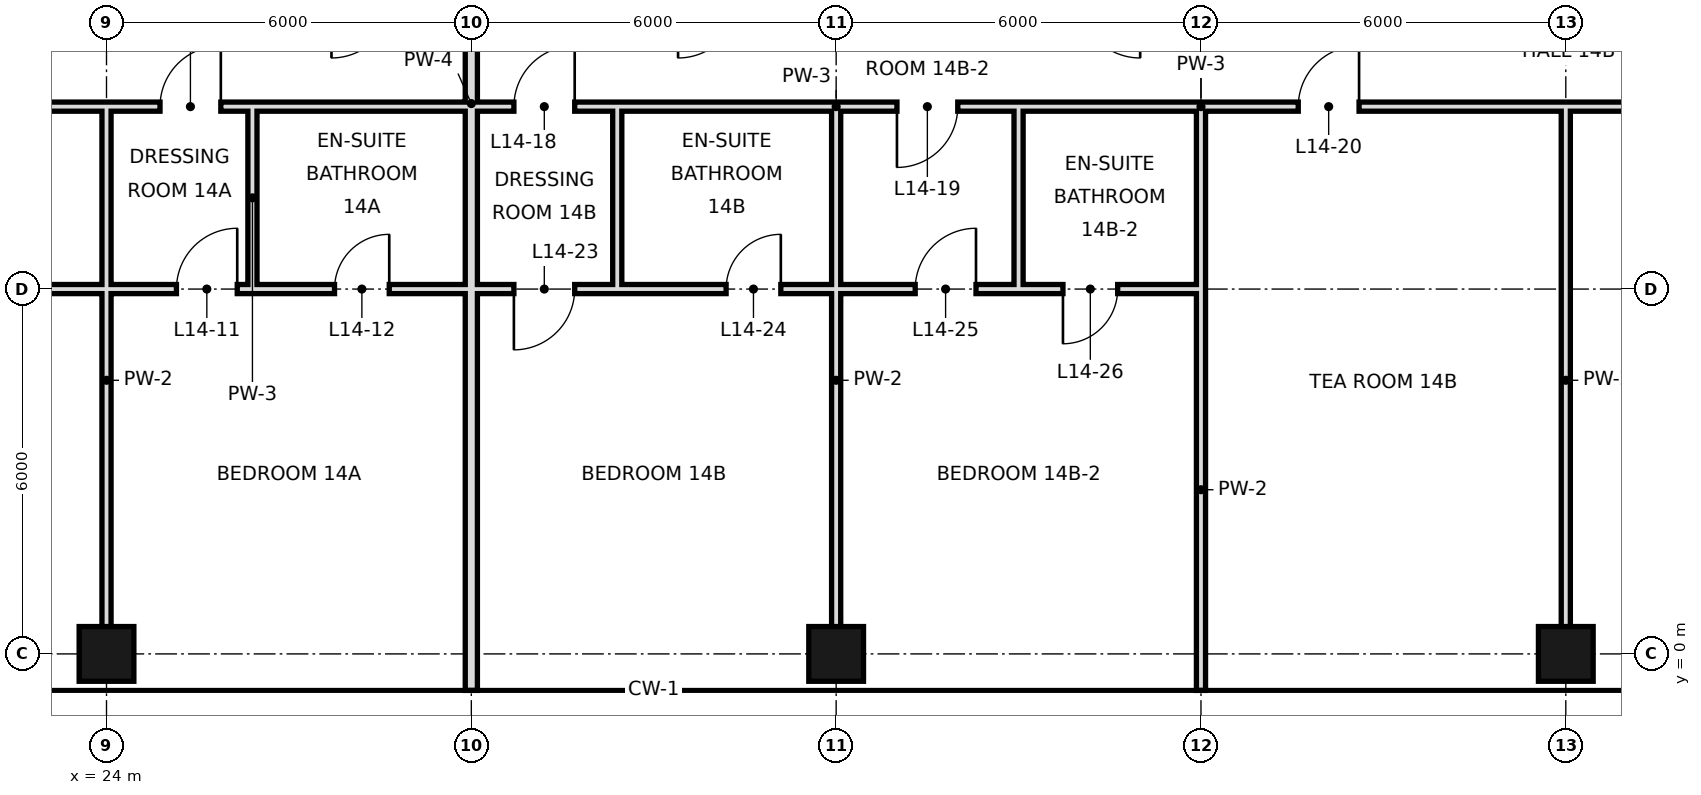
"""IFC4 building model, lengths in metres.
Left out: names, types, materials, properties, quantities, classifications, styles, units other than length and angle.
Written with IfcOpenShell. Run it as: python <this file> out.ifc"""

import sys

from ifc_helpers import new_model, si_unit, direction, frame, frame_2d, origin, origin_2d, place, context, subcontext, project, spatial, rectangle, hollow_rectangle, extrude, element, fill, save


model = new_model("IFC4")
c1 = context("Model", 3, precision=1e-05, world=origin(), true_north=direction((0.0, 1.0)))
c2 = subcontext(c1, "Body", "Model", "MODEL_VIEW")
j1 = project(units=[si_unit("LENGTHUNIT", "METRE"), si_unit("PLANEANGLEUNIT", "RADIAN")], contexts=[c1])
p1 = place(None, origin())
s1 = spatial("IfcSite", under=j1, at=p1, CompositionType="ELEMENT")
p2 = place(p1, origin())
s2 = spatial("IfcBuilding", under=s1, at=p2, CompositionType="ELEMENT")
p3 = place(p2, frame((0.0, 0.0, 71.4)))
s3 = spatial("IfcBuildingStorey", under=s2, at=p3, CompositionType="ELEMENT", Elevation=71.4)
for number, where, z_axis, x_axis in (
    (1, (24.0, 0.0, 0.0), (0.0, 0.0, 1.0), (1.0, 0.0, 0.0)),
    (2, (36.0, 0.0, 0.0), (0.0, 0.0, 1.0), (1.0, 0.0, 0.0)),
    (3, (48.0, 0.0, 0.0), (0.0, 0.0, 1.0), (1.0, 0.0, 0.0)),
):
    element("IfcColumn", number, at=place(p3, frame(where, z_axis=z_axis, x_axis=x_axis)), inside=s3, PredefinedType="COLUMN", context=c2, shape_type="SweptSolid", body=[
        extrude(hollow_rectangle(XDim=0.9, YDim=0.9, WallThickness=0.045, at=origin_2d()), origin(), (0.0, 0.0, 1.0), 3.6),
    ])
p4 = place(p3, frame((24.0, 0.0, 0.0), z_axis=(0.0, 0.0, 1.0), x_axis=(0.0, 1.0, 0.0)))
e4 = element("IfcWall", 4, at=p4, inside=s3, PredefinedType="PARTITIONING", context=c2, shape_type="SweptSolid", body=[
    extrude(rectangle(XDim=9.0, YDim=0.15, at=frame_2d((4.5, 0.0))), origin(), (0.0, 0.0, 1.0), 2.72),
])
p5 = place(p3, frame((26.4, 6.0, 0.0), z_axis=(0.0, 0.0, 1.0), x_axis=(0.0, 1.0, 0.0)))
e5 = element("IfcWall", 5, at=p5, inside=s3, PredefinedType="PARTITIONING", context=c2, shape_type="SweptSolid", body=[
    extrude(rectangle(XDim=3.0, YDim=0.15, at=frame_2d((1.5, 0.0))), origin(), (0.0, 0.0, 1.0), 3.42),
])
p6 = place(p3, frame((30.0, -0.6, 0.0), z_axis=(0.0, 0.0, 1.0), x_axis=(0.0, 1.0, 0.0)))
e6 = element("IfcWall", 6, at=p6, inside=s3, PredefinedType="SOLIDWALL", context=c2, shape_type="SweptSolid", body=[
    extrude(rectangle(XDim=19.3, YDim=0.2, at=frame_2d((9.65, 0.0))), origin(), (0.0, 0.0, 1.0), 2.72),
])
p7 = place(p3, frame((32.4, 6.0, 0.0), z_axis=(0.0, 0.0, 1.0), x_axis=(0.0, 1.0, 0.0)))
e7 = element("IfcWall", 7, at=p7, inside=s3, PredefinedType="PARTITIONING", context=c2, shape_type="SweptSolid", body=[
    extrude(rectangle(XDim=3.0, YDim=0.15, at=frame_2d((1.5, 0.0))), origin(), (0.0, 0.0, 1.0), 3.42),
])
p8 = place(p3, frame((36.0, 0.0, 0.0), z_axis=(0.0, 0.0, 1.0), x_axis=(0.0, 1.0, 0.0)))
e8 = element("IfcWall", 8, at=p8, inside=s3, PredefinedType="PARTITIONING", context=c2, shape_type="SweptSolid", body=[
    extrude(rectangle(XDim=6.0, YDim=0.15, at=frame_2d((3.0, 0.0))), origin(), (0.0, 0.0, 1.0), 2.72),
])
p9 = place(p3, frame((36.0, 6.0, 0.0), z_axis=(0.0, 0.0, 1.0), x_axis=(0.0, 1.0, 0.0)))
e9 = element("IfcWall", 9, at=p9, inside=s3, PredefinedType="PARTITIONING", context=c2, shape_type="SweptSolid", body=[
    extrude(rectangle(XDim=3.0, YDim=0.15, at=frame_2d((1.5, 0.0))), origin(), (0.0, 0.0, 1.0), 2.72),
])
p10 = place(p3, frame((39.0, 6.0, 0.0), z_axis=(0.0, 0.0, 1.0), x_axis=(0.0, 1.0, 0.0)))
e10 = element("IfcWall", 10, at=p10, inside=s3, PredefinedType="PARTITIONING", context=c2, shape_type="SweptSolid", body=[
    extrude(rectangle(XDim=3.0, YDim=0.15, at=frame_2d((1.5, 0.0))), origin(), (0.0, 0.0, 1.0), 3.42),
])
p11 = place(p3, frame((42.0, -0.6, 0.0), z_axis=(0.0, 0.0, 1.0), x_axis=(0.0, 1.0, 0.0)))
e11 = element("IfcWall", 11, at=p11, inside=s3, PredefinedType="PARTITIONING", context=c2, shape_type="SweptSolid", body=[
    extrude(rectangle(XDim=6.6, YDim=0.15, at=frame_2d((3.3, 0.0))), origin(), (0.0, 0.0, 1.0), 2.72),
])
p12 = place(p3, frame((42.0, 6.0, 0.0), z_axis=(0.0, 0.0, 1.0), x_axis=(0.0, 1.0, 0.0)))
e12 = element("IfcWall", 12, at=p12, inside=s3, PredefinedType="PARTITIONING", context=c2, shape_type="SweptSolid", body=[
    extrude(rectangle(XDim=3.0, YDim=0.15, at=frame_2d((1.5, 0.0))), origin(), (0.0, 0.0, 1.0), 2.72),
])
p13 = place(p3, frame((48.0, 0.0, 0.0), z_axis=(0.0, 0.0, 1.0), x_axis=(0.0, 1.0, 0.0)))
e13 = element("IfcWall", 13, at=p13, inside=s3, PredefinedType="PARTITIONING", context=c2, shape_type="SweptSolid", body=[
    extrude(rectangle(XDim=9.0, YDim=0.15, at=frame_2d((4.5, 0.0))), origin(), (0.0, 0.0, 1.0), 2.72),
])
p14 = place(p3, frame((0.0, 6.0, 0.0), z_axis=(0.0, 0.0, 1.0), x_axis=(1.0, 0.0, 0.0)))
e14 = element("IfcWall", 14, at=p14, inside=s3, PredefinedType="PARTITIONING", context=c2, shape_type="SweptSolid", body=[
    extrude(rectangle(XDim=26.4, YDim=0.15, at=frame_2d((13.2, 0.0))), origin(), (0.0, 0.0, 1.0), 2.97),
])
p15 = place(p14, frame((5.1, 0.0, 0.0)))
e15 = element("IfcOpeningElement", 15, at=p15, cuts=e14, PredefinedType="OPENING", context=c2, shape_type="SweptSolid", body=[
    extrude(rectangle(XDim=1.8, YDim=2.4, at=frame_2d((0.9, 1.2))), frame((0.0, 0.085, 0.0), z_axis=(0.0, -1.0, 0.0), x_axis=(1.0, 0.0, 0.0)), (0.0, 0.0, 1.0), 0.17),
])
p16 = place(p14, frame((12.25, 0.0, 0.0)))
e16 = element("IfcOpeningElement", 16, at=p16, cuts=e14, PredefinedType="OPENING", context=c2, shape_type="SweptSolid", body=[
    extrude(rectangle(XDim=1.8, YDim=2.4, at=frame_2d((0.9, 1.2))), frame((0.0, 0.085, 0.0), z_axis=(0.0, -1.0, 0.0), x_axis=(1.0, 0.0, 0.0)), (0.0, 0.0, 1.0), 0.17),
])
p17 = place(p14, frame((25.15, 0.0, 0.0)))
e17 = element("IfcOpeningElement", 17, at=p17, cuts=e14, PredefinedType="OPENING", context=c2, shape_type="SweptSolid", body=[
    extrude(rectangle(XDim=1.0, YDim=2.4, at=frame_2d((0.5, 1.2))), frame((0.0, 0.085, 0.0), z_axis=(0.0, -1.0, 0.0), x_axis=(1.0, 0.0, 0.0)), (0.0, 0.0, 1.0), 0.17),
])
p18 = place(p3, frame((30.0, 6.0, 0.0), z_axis=(0.0, 0.0, 1.0), x_axis=(1.0, 0.0, 0.0)))
e18 = element("IfcWall", 18, at=p18, inside=s3, PredefinedType="PARTITIONING", context=c2, shape_type="SweptSolid", body=[
    extrude(rectangle(XDim=2.4, YDim=0.15, at=frame_2d((1.2, 0.0))), origin(), (0.0, 0.0, 1.0), 2.97),
])
p19 = place(p18, frame((0.7, 0.0, 0.0)))
e19 = element("IfcOpeningElement", 19, at=p19, cuts=e18, PredefinedType="OPENING", context=c2, shape_type="SweptSolid", body=[
    extrude(rectangle(XDim=1.0, YDim=2.4, at=frame_2d((0.5, 1.2))), frame((0.0, 0.085, 0.0), z_axis=(0.0, -1.0, 0.0), x_axis=(1.0, 0.0, 0.0)), (0.0, 0.0, 1.0), 0.17),
])
p20 = place(p3, frame((36.0, 6.0, 0.0), z_axis=(0.0, 0.0, 1.0), x_axis=(1.0, 0.0, 0.0)))
e20 = element("IfcWall", 20, at=p20, inside=s3, PredefinedType="PARTITIONING", context=c2, shape_type="SweptSolid", body=[
    extrude(rectangle(XDim=3.0, YDim=0.15, at=frame_2d((1.5, 0.0))), origin(), (0.0, 0.0, 1.0), 2.97),
])
p21 = place(p20, frame((1.3, 0.0, 0.0)))
e21 = element("IfcOpeningElement", 21, at=p21, cuts=e20, PredefinedType="OPENING", context=c2, shape_type="SweptSolid", body=[
    extrude(rectangle(XDim=1.0, YDim=2.4, at=frame_2d((0.5, 1.2))), frame((0.0, 0.085, 0.0), z_axis=(0.0, -1.0, 0.0), x_axis=(1.0, 0.0, 0.0)), (0.0, 0.0, 1.0), 0.17),
])
p22 = place(p3, frame((26.4, 6.0, 0.0), z_axis=(0.0, 0.0, 1.0), x_axis=(1.0, 0.0, 0.0)))
e22 = element("IfcWall", 22, at=p22, inside=s3, PredefinedType="PARTITIONING", context=c2, shape_type="SweptSolid", body=[
    extrude(rectangle(XDim=3.6, YDim=0.15, at=frame_2d((1.8, 0.0))), origin(), (0.0, 0.0, 1.0), 2.97),
])
p23 = place(p22, frame((1.35, 0.0, 0.0)))
e23 = element("IfcOpeningElement", 23, at=p23, cuts=e22, PredefinedType="OPENING", context=c2, shape_type="SweptSolid", body=[
    extrude(rectangle(XDim=0.9, YDim=2.4, at=frame_2d((0.45, 1.2))), frame((0.0, 0.085, 0.0), z_axis=(0.0, -1.0, 0.0), x_axis=(1.0, 0.0, 0.0)), (0.0, 0.0, 1.0), 0.17),
])
p24 = place(p3, frame((32.4, 6.0, 0.0), z_axis=(0.0, 0.0, 1.0), x_axis=(1.0, 0.0, 0.0)))
e24 = element("IfcWall", 24, at=p24, inside=s3, PredefinedType="PARTITIONING", context=c2, shape_type="SweptSolid", body=[
    extrude(rectangle(XDim=3.6, YDim=0.15, at=frame_2d((1.8, 0.0))), origin(), (0.0, 0.0, 1.0), 2.97),
])
p25 = place(p24, frame((1.79, 0.0, 0.0)))
e25 = element("IfcOpeningElement", 25, at=p25, cuts=e24, PredefinedType="OPENING", context=c2, shape_type="SweptSolid", body=[
    extrude(rectangle(XDim=0.9, YDim=2.4, at=frame_2d((0.45, 1.2))), frame((0.0, 0.085, 0.0), z_axis=(0.0, -1.0, 0.0), x_axis=(1.0, 0.0, 0.0)), (0.0, 0.0, 1.0), 0.17),
])
p26 = place(p3, frame((39.0, 6.0, 0.0), z_axis=(0.0, 0.0, 1.0), x_axis=(1.0, 0.0, 0.0)))
e26 = element("IfcWall", 26, at=p26, inside=s3, PredefinedType="PARTITIONING", context=c2, shape_type="SweptSolid", body=[
    extrude(rectangle(XDim=3.0, YDim=0.15, at=frame_2d((1.5, 0.0))), origin(), (0.0, 0.0, 1.0), 2.97),
])
p27 = place(p26, frame((0.73, 0.0, 0.0)))
e27 = element("IfcOpeningElement", 27, at=p27, cuts=e26, PredefinedType="OPENING", context=c2, shape_type="SweptSolid", body=[
    extrude(rectangle(XDim=0.9, YDim=2.4, at=frame_2d((0.45, 1.2))), frame((0.0, 0.085, 0.0), z_axis=(0.0, -1.0, 0.0), x_axis=(1.0, 0.0, 0.0)), (0.0, 0.0, 1.0), 0.17),
])
p28 = place(p3, frame((-0.6, 9.0, 0.0), z_axis=(0.0, 0.0, 1.0), x_axis=(1.0, 0.0, 0.0)))
e28 = element("IfcWall", 28, at=p28, inside=s3, PredefinedType="PARTITIONING", context=c2, shape_type="SweptSolid", body=[
    extrude(rectangle(XDim=27.0, YDim=0.15, at=frame_2d((13.5, 0.0))), origin(), (0.0, 0.0, 1.0), 3.42),
])
p29 = place(p28, frame((5.7, 0.0, 0.0)))
e29 = element("IfcOpeningElement", 29, at=p29, cuts=e28, PredefinedType="OPENING", context=c2, shape_type="SweptSolid", body=[
    extrude(rectangle(XDim=1.8, YDim=2.4, at=frame_2d((0.9, 1.2))), frame((0.0, 0.085, 0.0), z_axis=(0.0, -1.0, 0.0), x_axis=(1.0, 0.0, 0.0)), (0.0, 0.0, 1.0), 0.17),
])
p30 = place(p28, frame((17.7, 0.0, 0.0)))
e30 = element("IfcOpeningElement", 30, at=p30, cuts=e28, PredefinedType="OPENING", context=c2, shape_type="SweptSolid", body=[
    extrude(rectangle(XDim=1.8, YDim=2.4, at=frame_2d((0.9, 1.2))), frame((0.0, 0.085, 0.0), z_axis=(0.0, -1.0, 0.0), x_axis=(1.0, 0.0, 0.0)), (0.0, 0.0, 1.0), 0.17),
])
p31 = place(p28, frame((25.48, 0.0, 0.0)))
e31 = element("IfcOpeningElement", 31, at=p31, cuts=e28, PredefinedType="OPENING", context=c2, shape_type="SweptSolid", body=[
    extrude(rectangle(XDim=1.0, YDim=2.4, at=frame_2d((0.5, 1.2))), frame((0.0, 0.085, 0.0), z_axis=(0.0, -1.0, 0.0), x_axis=(1.0, 0.0, 0.0)), (0.0, 0.0, 1.0), 0.17),
])
p32 = place(p3, frame((30.0, 9.0, 0.0), z_axis=(0.0, 0.0, 1.0), x_axis=(1.0, 0.0, 0.0)))
e32 = element("IfcWall", 32, at=p32, inside=s3, PredefinedType="PARTITIONING", context=c2, shape_type="SweptSolid", body=[
    extrude(rectangle(XDim=2.4, YDim=0.15, at=frame_2d((1.2, 0.0))), origin(), (0.0, 0.0, 1.0), 3.42),
])
p33 = place(p32, frame((0.7, 0.0, 0.0)))
e33 = element("IfcOpeningElement", 33, at=p33, cuts=e32, PredefinedType="OPENING", context=c2, shape_type="SweptSolid", body=[
    extrude(rectangle(XDim=1.0, YDim=2.4, at=frame_2d((0.5, 1.2))), frame((0.0, 0.085, 0.0), z_axis=(0.0, -1.0, 0.0), x_axis=(1.0, 0.0, 0.0)), (0.0, 0.0, 1.0), 0.17),
])
p34 = place(p3, frame((36.0, 9.0, 0.0), z_axis=(0.0, 0.0, 1.0), x_axis=(1.0, 0.0, 0.0)))
e34 = element("IfcWall", 34, at=p34, inside=s3, PredefinedType="PARTITIONING", context=c2, shape_type="SweptSolid", body=[
    extrude(rectangle(XDim=3.0, YDim=0.15, at=frame_2d((1.5, 0.0))), origin(), (0.0, 0.0, 1.0), 3.42),
])
p35 = place(p34, frame((1.0, 0.0, 0.0)))
e35 = element("IfcOpeningElement", 35, at=p35, cuts=e34, PredefinedType="OPENING", context=c2, shape_type="SweptSolid", body=[
    extrude(rectangle(XDim=1.0, YDim=2.4, at=frame_2d((0.5, 1.2))), frame((0.0, 0.085, 0.0), z_axis=(0.0, -1.0, 0.0), x_axis=(1.0, 0.0, 0.0)), (0.0, 0.0, 1.0), 0.17),
])
p36 = place(p3, frame((42.0, 9.0, 0.0), z_axis=(0.0, 0.0, 1.0), x_axis=(1.0, 0.0, 0.0)))
e36 = element("IfcWall", 36, at=p36, inside=s3, PredefinedType="PARTITIONING", context=c2, shape_type="SweptSolid", body=[
    extrude(rectangle(XDim=24.6, YDim=0.15, at=frame_2d((12.3, 0.0))), origin(), (0.0, 0.0, 1.0), 3.42),
])
p37 = place(p36, frame((1.6, 0.0, 0.0)))
e37 = element("IfcOpeningElement", 37, at=p37, cuts=e36, PredefinedType="OPENING", context=c2, shape_type="SweptSolid", body=[
    extrude(rectangle(XDim=1.0, YDim=2.4, at=frame_2d((0.5, 1.2))), frame((0.0, 0.085, 0.0), z_axis=(0.0, -1.0, 0.0), x_axis=(1.0, 0.0, 0.0)), (0.0, 0.0, 1.0), 0.17),
])
p38 = place(p36, frame((8.5, 0.0, 0.0)))
e38 = element("IfcOpeningElement", 38, at=p38, cuts=e36, PredefinedType="OPENING", context=c2, shape_type="SweptSolid", body=[
    extrude(rectangle(XDim=1.0, YDim=2.4, at=frame_2d((0.5, 1.2))), frame((0.0, 0.085, 0.0), z_axis=(0.0, -1.0, 0.0), x_axis=(1.0, 0.0, 0.0)), (0.0, 0.0, 1.0), 0.17),
])
p39 = place(p36, frame((12.25, 0.0, 0.0)))
e39 = element("IfcOpeningElement", 39, at=p39, cuts=e36, PredefinedType="OPENING", context=c2, shape_type="SweptSolid", body=[
    extrude(rectangle(XDim=1.8, YDim=2.4, at=frame_2d((0.9, 1.2))), frame((0.0, 0.085, 0.0), z_axis=(0.0, -1.0, 0.0), x_axis=(1.0, 0.0, 0.0)), (0.0, 0.0, 1.0), 0.17),
])
for number, where, z_axis, x_axis in (
    (40, (26.4, 9.0, 0.0), (0.0, 0.0, 1.0), (1.0, 0.0, 0.0)),
    (41, (32.4, 9.0, 0.0), (0.0, 0.0, 1.0), (1.0, 0.0, 0.0)),
):
    element("IfcWall", number, at=place(p3, frame(where, z_axis=z_axis, x_axis=x_axis)), inside=s3, PredefinedType="PARTITIONING", context=c2, shape_type="SweptSolid", body=[
        extrude(rectangle(XDim=3.6, YDim=0.15, at=frame_2d((1.8, 0.0))), origin(), (0.0, 0.0, 1.0), 3.42),
    ])
p40 = place(p3, frame((39.0, 9.0, 0.0), z_axis=(0.0, 0.0, 1.0), x_axis=(1.0, 0.0, 0.0)))
e42 = element("IfcWall", 42, at=p40, inside=s3, PredefinedType="PARTITIONING", context=c2, shape_type="SweptSolid", body=[
    extrude(rectangle(XDim=3.0, YDim=0.15, at=frame_2d((1.5, 0.0))), origin(), (0.0, 0.0, 1.0), 3.42),
])
p41 = place(p31, frame((1.0, 0.0, 0.0), z_axis=(0.0, 0.0, 1.0), x_axis=(-1.0, 0.0, 0.0)))
e43 = element("IfcDoor", 43, at=p41, inside=s3, OperationType="SINGLE_SWING_LEFT", PredefinedType="DOOR", context=c2, shape_type="SweptSolid", body=[
    extrude(rectangle(XDim=1.0, YDim=2.4, at=frame_2d((0.5, 1.2))), frame((0.0, 0.025, 0.0), z_axis=(0.0, -1.0, 0.0), x_axis=(1.0, 0.0, 0.0)), (0.0, 0.0, 1.0), 0.05),
])
fill(e31, e43)
p42 = place(p17, frame((1.0, 0.0, 0.0), z_axis=(0.0, 0.0, 1.0), x_axis=(-1.0, 0.0, 0.0)))
e44 = element("IfcDoor", 44, at=p42, inside=s3, OperationType="SINGLE_SWING_LEFT", PredefinedType="DOOR", context=c2, shape_type="SweptSolid", body=[
    extrude(rectangle(XDim=1.0, YDim=2.4, at=frame_2d((0.5, 1.2))), frame((0.0, 0.025, 0.0), z_axis=(0.0, -1.0, 0.0), x_axis=(1.0, 0.0, 0.0)), (0.0, 0.0, 1.0), 0.05),
])
fill(e17, e44)
p43 = place(p23, frame((0.9, 0.0, 0.0), z_axis=(0.0, 0.0, 1.0), x_axis=(-1.0, 0.0, 0.0)))
e45 = element("IfcDoor", 45, at=p43, inside=s3, OperationType="SINGLE_SWING_LEFT", PredefinedType="DOOR", context=c2, shape_type="SweptSolid", body=[
    extrude(rectangle(XDim=0.9, YDim=2.4, at=frame_2d((0.45, 1.2))), frame((0.0, 0.025, 0.0), z_axis=(0.0, -1.0, 0.0), x_axis=(1.0, 0.0, 0.0)), (0.0, 0.0, 1.0), 0.05),
])
fill(e23, e45)
p44 = place(p33, frame((1.0, 0.0, 0.0), z_axis=(0.0, 0.0, 1.0), x_axis=(-1.0, 0.0, 0.0)))
e46 = element("IfcDoor", 46, at=p44, inside=s3, OperationType="SINGLE_SWING_LEFT", PredefinedType="DOOR", context=c2, shape_type="SweptSolid", body=[
    extrude(rectangle(XDim=1.0, YDim=2.4, at=frame_2d((0.5, 1.2))), frame((0.0, 0.025, 0.0), z_axis=(0.0, -1.0, 0.0), x_axis=(1.0, 0.0, 0.0)), (0.0, 0.0, 1.0), 0.05),
])
fill(e33, e46)
p45 = place(p35, frame((1.0, 0.0, 0.0), z_axis=(0.0, 0.0, 1.0), x_axis=(-1.0, 0.0, 0.0)))
e47 = element("IfcDoor", 47, at=p45, inside=s3, OperationType="SINGLE_SWING_RIGHT", PredefinedType="DOOR", context=c2, shape_type="SweptSolid", body=[
    extrude(rectangle(XDim=1.0, YDim=2.4, at=frame_2d((0.5, 1.2))), frame((0.0, 0.025, 0.0), z_axis=(0.0, -1.0, 0.0), x_axis=(1.0, 0.0, 0.0)), (0.0, 0.0, 1.0), 0.05),
])
fill(e35, e47)
p46 = place(p37, frame((1.0, 0.0, 0.0), z_axis=(0.0, 0.0, 1.0), x_axis=(-1.0, 0.0, 0.0)))
e48 = element("IfcDoor", 48, at=p46, inside=s3, OperationType="SINGLE_SWING_LEFT", PredefinedType="DOOR", context=c2, shape_type="SweptSolid", body=[
    extrude(rectangle(XDim=1.0, YDim=2.4, at=frame_2d((0.5, 1.2))), frame((0.0, 0.025, 0.0), z_axis=(0.0, -1.0, 0.0), x_axis=(1.0, 0.0, 0.0)), (0.0, 0.0, 1.0), 0.05),
])
fill(e37, e48)
p47 = place(p19, frame((1.0, 0.0, 0.0), z_axis=(0.0, 0.0, 1.0), x_axis=(-1.0, 0.0, 0.0)))
e49 = element("IfcDoor", 49, at=p47, inside=s3, OperationType="SINGLE_SWING_RIGHT", PredefinedType="DOOR", context=c2, shape_type="SweptSolid", body=[
    extrude(rectangle(XDim=1.0, YDim=2.4, at=frame_2d((0.5, 1.2))), frame((0.0, 0.025, 0.0), z_axis=(0.0, -1.0, 0.0), x_axis=(1.0, 0.0, 0.0)), (0.0, 0.0, 1.0), 0.05),
])
fill(e19, e49)
p48 = place(p25, frame((0.9, 0.0, 0.0), z_axis=(0.0, 0.0, 1.0), x_axis=(-1.0, 0.0, 0.0)))
e50 = element("IfcDoor", 50, at=p48, inside=s3, OperationType="SINGLE_SWING_LEFT", PredefinedType="DOOR", context=c2, shape_type="SweptSolid", body=[
    extrude(rectangle(XDim=0.9, YDim=2.4, at=frame_2d((0.45, 1.2))), frame((0.0, 0.025, 0.0), z_axis=(0.0, -1.0, 0.0), x_axis=(1.0, 0.0, 0.0)), (0.0, 0.0, 1.0), 0.05),
])
fill(e25, e50)
p49 = place(p21, frame((1.0, 0.0, 0.0), z_axis=(0.0, 0.0, 1.0), x_axis=(-1.0, 0.0, 0.0)))
e51 = element("IfcDoor", 51, at=p49, inside=s3, OperationType="SINGLE_SWING_LEFT", PredefinedType="DOOR", context=c2, shape_type="SweptSolid", body=[
    extrude(rectangle(XDim=1.0, YDim=2.4, at=frame_2d((0.5, 1.2))), frame((0.0, 0.025, 0.0), z_axis=(0.0, -1.0, 0.0), x_axis=(1.0, 0.0, 0.0)), (0.0, 0.0, 1.0), 0.05),
])
fill(e21, e51)
p50 = place(p27, frame((0.9, 0.0, 0.0), z_axis=(0.0, 0.0, 1.0), x_axis=(-1.0, 0.0, 0.0)))
e52 = element("IfcDoor", 52, at=p50, inside=s3, OperationType="SINGLE_SWING_RIGHT", PredefinedType="DOOR", context=c2, shape_type="SweptSolid", body=[
    extrude(rectangle(XDim=0.9, YDim=2.4, at=frame_2d((0.45, 1.2))), frame((0.0, 0.025, 0.0), z_axis=(0.0, -1.0, 0.0), x_axis=(1.0, 0.0, 0.0)), (0.0, 0.0, 1.0), 0.05),
])
fill(e27, e52)
save(model, sys.argv[1])
